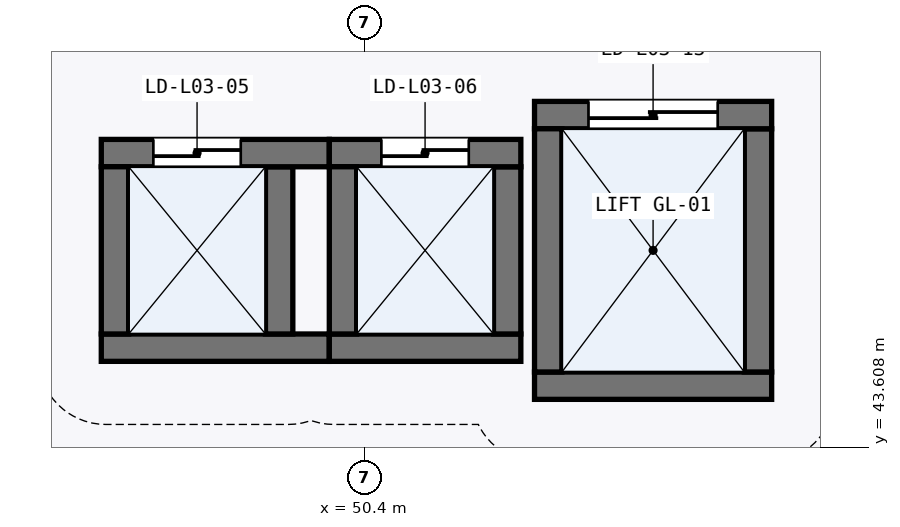
"""IFC4 building model, lengths in metres.
Left out: names, types, materials, properties, quantities, classifications, styles, units other than length and angle.
Written with IfcOpenShell. Run it as: python <this file> out.ifc"""

import sys

from ifc_helpers import new_model, si_unit, direction, frame, frame_2d, origin, place, context, subcontext, project, spatial, rectangle, extrude, element, fill, save


model = new_model("IFC4")
c1 = context("Model", 3, precision=1e-05, world=origin(), true_north=direction((0.0, 1.0)))
c2 = subcontext(c1, "Body", "Model", "MODEL_VIEW")
j1 = project(units=[si_unit("LENGTHUNIT", "METRE"), si_unit("PLANEANGLEUNIT", "RADIAN")], contexts=[c1])
p1 = place(None, origin())
s1 = spatial("IfcSite", under=j1, at=p1, CompositionType="ELEMENT")
p2 = place(p1, origin())
s2 = spatial("IfcBuilding", under=s1, at=p2, CompositionType="ELEMENT")
p3 = place(p2, frame((0.0, 0.0, 11.4)))
s3 = spatial("IfcBuildingStorey", under=s2, at=p3, CompositionType="ELEMENT", Elevation=11.4)
p4 = place(p3, frame((46.94, 44.92, 0.0), z_axis=(0.0, 0.0, 1.0), x_axis=(1.0, 0.0, 0.0)))
e1 = element("IfcWall", 1, at=p4, inside=s3, PredefinedType="SHEAR", context=c2, shape_type="SweptSolid", body=[
    extrude(rectangle(XDim=3.0, YDim=0.36, at=frame_2d((1.5, 0.0))), origin(), (0.0, 0.0, 1.0), 4.845),
])
p5 = place(p3, frame((49.28, 45.1, 0.0), z_axis=(0.0, 0.0, 1.0), x_axis=(0.0, 1.0, 0.0)))
e2 = element("IfcWall", 2, at=p5, inside=s3, PredefinedType="SHEAR", context=c2, shape_type="SweptSolid", body=[
    extrude(rectangle(XDim=2.2, YDim=0.36, at=frame_2d((1.1, 0.0))), origin(), (0.0, 0.0, 1.0), 4.845),
])
p6 = place(p3, frame((49.94, 47.48, 0.0), z_axis=(0.0, 0.0, 1.0), x_axis=(-1.0, 0.0, 0.0)))
e3 = element("IfcWall", 3, at=p6, inside=s3, PredefinedType="SHEAR", context=c2, shape_type="SweptSolid", body=[
    extrude(rectangle(XDim=3.0, YDim=0.36, at=frame_2d((1.5, 0.0))), origin(), (0.0, 0.0, 1.0), 4.845),
])
p7 = place(p6, frame((1.165, 0.0, 0.0)))
e4 = element("IfcOpeningElement", 4, at=p7, cuts=e3, PredefinedType="OPENING", context=c2, shape_type="SweptSolid", body=[
    extrude(rectangle(XDim=1.15, YDim=2.2, at=frame_2d((0.575, 1.1))), frame((0.0, 0.19, 0.0), z_axis=(0.0, -1.0, 0.0), x_axis=(1.0, 0.0, 0.0)), (0.0, 0.0, 1.0), 0.38),
])
p8 = place(p3, frame((47.12, 47.3, 0.0), z_axis=(0.0, 0.0, 1.0), x_axis=(0.0, -1.0, 0.0)))
e5 = element("IfcWall", 5, at=p8, inside=s3, PredefinedType="SHEAR", context=c2, shape_type="SweptSolid", body=[
    extrude(rectangle(XDim=2.2, YDim=0.36, at=frame_2d((1.1, 0.0))), origin(), (0.0, 0.0, 1.0), 4.845),
])
p9 = place(p3, frame((49.94, 44.92, 0.0), z_axis=(0.0, 0.0, 1.0), x_axis=(1.0, 0.0, 0.0)))
e6 = element("IfcWall", 6, at=p9, inside=s3, PredefinedType="SHEAR", context=c2, shape_type="SweptSolid", body=[
    extrude(rectangle(XDim=2.52, YDim=0.36, at=frame_2d((1.26, 0.0))), origin(), (0.0, 0.0, 1.0), 4.845),
])
p10 = place(p3, frame((52.28, 45.1, 0.0), z_axis=(0.0, 0.0, 1.0), x_axis=(0.0, 1.0, 0.0)))
e7 = element("IfcWall", 7, at=p10, inside=s3, PredefinedType="SHEAR", context=c2, shape_type="SweptSolid", body=[
    extrude(rectangle(XDim=2.2, YDim=0.36, at=frame_2d((1.1, 0.0))), origin(), (0.0, 0.0, 1.0), 4.845),
])
p11 = place(p3, frame((52.46, 47.48, 0.0), z_axis=(0.0, 0.0, 1.0), x_axis=(-1.0, 0.0, 0.0)))
e8 = element("IfcWall", 8, at=p11, inside=s3, PredefinedType="SHEAR", context=c2, shape_type="SweptSolid", body=[
    extrude(rectangle(XDim=2.52, YDim=0.36, at=frame_2d((1.26, 0.0))), origin(), (0.0, 0.0, 1.0), 4.845),
])
p12 = place(p11, frame((0.685, 0.0, 0.0)))
e9 = element("IfcOpeningElement", 9, at=p12, cuts=e8, PredefinedType="OPENING", context=c2, shape_type="SweptSolid", body=[
    extrude(rectangle(XDim=1.15, YDim=2.2, at=frame_2d((0.575, 1.1))), frame((0.0, 0.19, 0.0), z_axis=(0.0, -1.0, 0.0), x_axis=(1.0, 0.0, 0.0)), (0.0, 0.0, 1.0), 0.38),
])
p13 = place(p3, frame((50.12, 47.3, 0.0), z_axis=(0.0, 0.0, 1.0), x_axis=(0.0, -1.0, 0.0)))
e10 = element("IfcWall", 10, at=p13, inside=s3, PredefinedType="SHEAR", context=c2, shape_type="SweptSolid", body=[
    extrude(rectangle(XDim=2.2, YDim=0.36, at=frame_2d((1.1, 0.0))), origin(), (0.0, 0.0, 1.0), 4.845),
])
p14 = place(p3, frame((52.64, 44.42, 0.0), z_axis=(0.0, 0.0, 1.0), x_axis=(1.0, 0.0, 0.0)))
e11 = element("IfcWall", 11, at=p14, inside=s3, PredefinedType="SHEAR", context=c2, shape_type="SweptSolid", body=[
    extrude(rectangle(XDim=3.12, YDim=0.36, at=frame_2d((1.56, 0.0))), origin(), (0.0, 0.0, 1.0), 4.845),
])
p15 = place(p3, frame((55.58, 44.6, 0.0), z_axis=(0.0, 0.0, 1.0), x_axis=(0.0, 1.0, 0.0)))
e12 = element("IfcWall", 12, at=p15, inside=s3, PredefinedType="SHEAR", context=c2, shape_type="SweptSolid", body=[
    extrude(rectangle(XDim=3.2, YDim=0.36, at=frame_2d((1.6, 0.0))), origin(), (0.0, 0.0, 1.0), 4.845),
])
p16 = place(p3, frame((55.76, 47.98, 0.0), z_axis=(0.0, 0.0, 1.0), x_axis=(-1.0, 0.0, 0.0)))
e13 = element("IfcWall", 13, at=p16, inside=s3, PredefinedType="SHEAR", context=c2, shape_type="SweptSolid", body=[
    extrude(rectangle(XDim=3.12, YDim=0.36, at=frame_2d((1.56, 0.0))), origin(), (0.0, 0.0, 1.0), 4.845),
])
p17 = place(p16, frame((0.71, 0.0, 0.0)))
e14 = element("IfcOpeningElement", 14, at=p17, cuts=e13, PredefinedType="OPENING", context=c2, shape_type="SweptSolid", body=[
    extrude(rectangle(XDim=1.7, YDim=2.3, at=frame_2d((0.85, 1.15))), frame((0.0, 0.19, 0.0), z_axis=(0.0, -1.0, 0.0), x_axis=(1.0, 0.0, 0.0)), (0.0, 0.0, 1.0), 0.38),
])
p18 = place(p3, frame((52.82, 47.8, 0.0), z_axis=(0.0, 0.0, 1.0), x_axis=(0.0, -1.0, 0.0)))
e15 = element("IfcWall", 15, at=p18, inside=s3, PredefinedType="SHEAR", context=c2, shape_type="SweptSolid", body=[
    extrude(rectangle(XDim=3.2, YDim=0.36, at=frame_2d((1.6, 0.0))), origin(), (0.0, 0.0, 1.0), 4.845),
])
p19 = place(p7, frame((1.15, 0.0, 0.0), z_axis=(0.0, 0.0, 1.0), x_axis=(-1.0, 0.0, 0.0)))
e16 = element("IfcDoor", 16, at=p19, inside=s3, OperationType="DOUBLE_DOOR_SLIDING", PredefinedType="DOOR", context=c2, shape_type="SweptSolid", body=[
    extrude(rectangle(XDim=1.15, YDim=2.2, at=frame_2d((0.575, 1.1))), frame((0.0, 0.025, 0.0), z_axis=(0.0, -1.0, 0.0), x_axis=(1.0, 0.0, 0.0)), (0.0, 0.0, 1.0), 0.05),
])
fill(e4, e16)
p20 = place(p12, frame((1.15, 0.0, 0.0), z_axis=(0.0, 0.0, 1.0), x_axis=(-1.0, 0.0, 0.0)))
e17 = element("IfcDoor", 17, at=p20, inside=s3, OperationType="DOUBLE_DOOR_SLIDING", PredefinedType="DOOR", context=c2, shape_type="SweptSolid", body=[
    extrude(rectangle(XDim=1.15, YDim=2.2, at=frame_2d((0.575, 1.1))), frame((0.0, 0.025, 0.0), z_axis=(0.0, -1.0, 0.0), x_axis=(1.0, 0.0, 0.0)), (0.0, 0.0, 1.0), 0.05),
])
fill(e9, e17)
p21 = place(p17, frame((1.7, 0.0, 0.0), z_axis=(0.0, 0.0, 1.0), x_axis=(-1.0, 0.0, 0.0)))
e18 = element("IfcDoor", 18, at=p21, inside=s3, OperationType="DOUBLE_DOOR_SLIDING", PredefinedType="DOOR", context=c2, shape_type="SweptSolid", body=[
    extrude(rectangle(XDim=1.7, YDim=2.3, at=frame_2d((0.85, 1.15))), frame((0.0, 0.025, 0.0), z_axis=(0.0, -1.0, 0.0), x_axis=(1.0, 0.0, 0.0)), (0.0, 0.0, 1.0), 0.05),
])
fill(e14, e18)
save(model, sys.argv[1])
